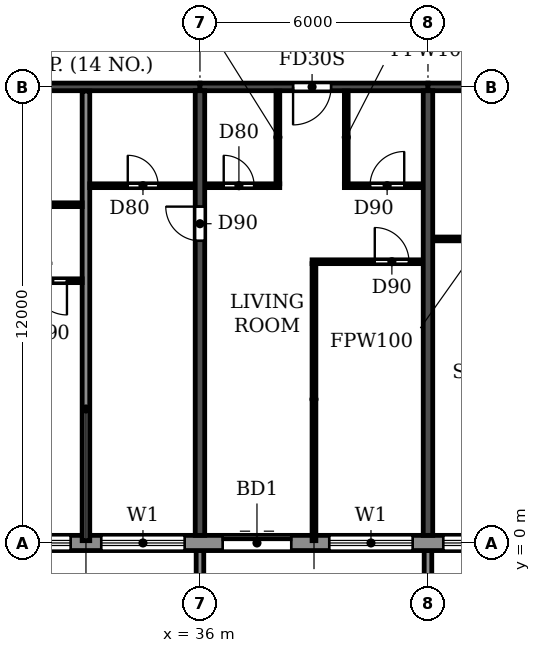
"""IFC4 building model, lengths in metres.
Left out: names, types, materials, properties, quantities, classifications, styles, units other than length and angle.
Written with IfcOpenShell. Run it as: python <this file> out.ifc"""

import sys

from ifc_helpers import new_model, si_unit, direction, frame, frame_2d, origin, place, context, subcontext, project, spatial, polyline, rectangle, outline, extrude, source, transform, mapped, element, fill, save


model = new_model("IFC4")
c1 = context("Model", 3, precision=1e-05, world=origin(), true_north=direction((0.0, 1.0)))
c2 = subcontext(c1, "Body", "Model", "MODEL_VIEW")
j1 = project(units=[si_unit("LENGTHUNIT", "METRE"), si_unit("PLANEANGLEUNIT", "RADIAN")], contexts=[c1])
p1 = place(None, origin())
s1 = spatial("IfcSite", under=j1, at=p1, CompositionType="ELEMENT")
p2 = place(p1, origin())
s2 = spatial("IfcBuilding", under=s1, at=p2, CompositionType="ELEMENT")
p3 = place(p2, frame((0.0, 0.0, 201.6)))
s3 = spatial("IfcBuildingStorey", under=s2, at=p3, CompositionType="ELEMENT", Elevation=201.6)
p4 = place(p3, frame((36.0, 0.2, 0.0), z_axis=(0.0, 0.0, 1.0), x_axis=(0.0, 1.0, 0.0)))
e1 = element("IfcWall", 1, at=p4, inside=s3, PredefinedType="SHEAR", context=c2, shape_type="SweptSolid", body=[
    extrude(rectangle(XDim=11.7, YDim=0.25, at=frame_2d((5.85, 0.0))), origin(), (0.0, 0.0, 1.0), 3.08),
])
p5 = place(p4, frame((7.75, 0.0, 0.0)))
e2 = element("IfcOpeningElement", 2, at=p5, cuts=e1, PredefinedType="OPENING", context=c2, shape_type="SweptSolid", body=[
    extrude(rectangle(XDim=0.9, YDim=2.1, at=frame_2d((0.45, 1.05))), frame((0.0, 0.135, 0.0), z_axis=(0.0, -1.0, 0.0), x_axis=(1.0, 0.0, 0.0)), (0.0, 0.0, 1.0), 0.27),
])
p6 = place(p3, frame((42.0, 0.2, 0.0), z_axis=(0.0, 0.0, 1.0), x_axis=(0.0, 1.0, 0.0)))
e3 = element("IfcWall", 3, at=p6, inside=s3, PredefinedType="SHEAR", context=c2, shape_type="SweptSolid", body=[
    extrude(rectangle(XDim=11.7, YDim=0.25, at=frame_2d((5.85, 0.0))), origin(), (0.0, 0.0, 1.0), 3.08),
])
p7 = place(p3, frame((30.0, 12.0, 0.0), z_axis=(0.0, 0.0, 1.0), x_axis=(1.0, 0.0, 0.0)))
e4 = element("IfcWall", 4, at=p7, inside=s3, PredefinedType="SHEAR", context=c2, shape_type="SweptSolid", body=[
    extrude(rectangle(XDim=6.0, YDim=0.2, at=frame_2d((3.0, 0.0))), origin(), (0.0, 0.0, 1.0), 2.48),
])
p8 = place(p3, frame((36.0, 12.0, 0.0), z_axis=(0.0, 0.0, 1.0), x_axis=(1.0, 0.0, 0.0)))
e5 = element("IfcWall", 5, at=p8, inside=s3, PredefinedType="SHEAR", context=c2, shape_type="SweptSolid", body=[
    extrude(rectangle(XDim=6.0, YDim=0.2, at=frame_2d((3.0, 0.0))), origin(), (0.0, 0.0, 1.0), 2.48),
])
p9 = place(p8, frame((2.45, 0.0, 0.0)))
e6 = element("IfcOpeningElement", 6, at=p9, cuts=e5, PredefinedType="OPENING", context=c2, shape_type="SweptSolid", body=[
    extrude(rectangle(XDim=1.0, YDim=2.1, at=frame_2d((0.5, 1.05))), frame((0.0, 0.11, 0.0), z_axis=(0.0, -1.0, 0.0), x_axis=(1.0, 0.0, 0.0)), (0.0, 0.0, 1.0), 0.22),
])
p10 = place(p3, frame((42.0, 12.0, 0.0), z_axis=(0.0, 0.0, 1.0), x_axis=(1.0, 0.0, 0.0)))
e7 = element("IfcWall", 7, at=p10, inside=s3, PredefinedType="SHEAR", context=c2, shape_type="SweptSolid", body=[
    extrude(rectangle(XDim=6.0, YDim=0.2, at=frame_2d((3.0, 0.0))), origin(), (0.0, 0.0, 1.0), 2.48),
])
p11 = place(p10, frame((2.45, 0.0, 0.0)))
e8 = element("IfcOpeningElement", 8, at=p11, cuts=e7, PredefinedType="OPENING", context=c2, shape_type="SweptSolid", body=[
    extrude(rectangle(XDim=1.0, YDim=2.1, at=frame_2d((0.5, 1.05))), frame((0.0, 0.11, 0.0), z_axis=(0.0, -1.0, 0.0), x_axis=(1.0, 0.0, 0.0)), (0.0, 0.0, 1.0), 0.22),
])
p12 = place(p3, frame((22.683, 0.0, 0.0), z_axis=(0.0, 0.0, 1.0), x_axis=(1.0, 0.0, 0.0)))
e9 = element("IfcWall", 9, at=p12, inside=s3, PredefinedType="STANDARD", context=c2, shape_type="SweptSolid", body=[
    extrude(rectangle(XDim=56.634, YDim=0.4, at=frame_2d((28.317, 0.0))), origin(), (0.0, 0.0, 1.0), 3.08),
])
p13 = place(p12, frame((1.917, 0.0, 0.0)))
e10 = element("IfcOpeningElement", 10, at=p13, cuts=e9, PredefinedType="OPENING", context=c2, shape_type="SweptSolid", body=[
    extrude(rectangle(XDim=1.8, YDim=2.4, at=frame_2d((0.9, 1.2))), frame((0.0, 0.21, 0.0), z_axis=(0.0, -1.0, 0.0), x_axis=(1.0, 0.0, 0.0)), (0.0, 0.0, 1.0), 0.42),
])
p14 = place(p12, frame((4.717, 0.0, 0.9)))
e11 = element("IfcOpeningElement", 11, at=p14, cuts=e9, PredefinedType="OPENING", context=c2, shape_type="SweptSolid", body=[
    extrude(rectangle(XDim=2.2, YDim=1.5, at=frame_2d((1.1, 0.75))), frame((0.0, 0.21, 0.0), z_axis=(0.0, -1.0, 0.0), x_axis=(1.0, 0.0, 0.0)), (0.0, 0.0, 1.0), 0.42),
])
p15 = place(p12, frame((7.717, 0.0, 0.9)))
e12 = element("IfcOpeningElement", 12, at=p15, cuts=e9, PredefinedType="OPENING", context=c2, shape_type="SweptSolid", body=[
    extrude(rectangle(XDim=2.2, YDim=1.5, at=frame_2d((1.1, 0.75))), frame((0.0, 0.21, 0.0), z_axis=(0.0, -1.0, 0.0), x_axis=(1.0, 0.0, 0.0)), (0.0, 0.0, 1.0), 0.42),
])
p16 = place(p12, frame((10.717, 0.0, 0.9)))
e13 = element("IfcOpeningElement", 13, at=p16, cuts=e9, PredefinedType="OPENING", context=c2, shape_type="SweptSolid", body=[
    extrude(rectangle(XDim=2.2, YDim=1.5, at=frame_2d((1.1, 0.75))), frame((0.0, 0.21, 0.0), z_axis=(0.0, -1.0, 0.0), x_axis=(1.0, 0.0, 0.0)), (0.0, 0.0, 1.0), 0.42),
])
p17 = place(p12, frame((13.917, 0.0, 0.0)))
e14 = element("IfcOpeningElement", 14, at=p17, cuts=e9, PredefinedType="OPENING", context=c2, shape_type="SweptSolid", body=[
    extrude(rectangle(XDim=1.8, YDim=2.4, at=frame_2d((0.9, 1.2))), frame((0.0, 0.21, 0.0), z_axis=(0.0, -1.0, 0.0), x_axis=(1.0, 0.0, 0.0)), (0.0, 0.0, 1.0), 0.42),
])
p18 = place(p12, frame((16.717, 0.0, 0.9)))
e15 = element("IfcOpeningElement", 15, at=p18, cuts=e9, PredefinedType="OPENING", context=c2, shape_type="SweptSolid", body=[
    extrude(rectangle(XDim=2.2, YDim=1.5, at=frame_2d((1.1, 0.75))), frame((0.0, 0.21, 0.0), z_axis=(0.0, -1.0, 0.0), x_axis=(1.0, 0.0, 0.0)), (0.0, 0.0, 1.0), 0.42),
])
p19 = place(p12, frame((19.717, 0.0, 0.9)))
e16 = element("IfcOpeningElement", 16, at=p19, cuts=e9, PredefinedType="OPENING", context=c2, shape_type="SweptSolid", body=[
    extrude(rectangle(XDim=2.2, YDim=1.5, at=frame_2d((1.1, 0.75))), frame((0.0, 0.21, 0.0), z_axis=(0.0, -1.0, 0.0), x_axis=(1.0, 0.0, 0.0)), (0.0, 0.0, 1.0), 0.42),
])
p20 = place(p12, frame((22.717, 0.0, 0.9)))
e17 = element("IfcOpeningElement", 17, at=p20, cuts=e9, PredefinedType="OPENING", context=c2, shape_type="SweptSolid", body=[
    extrude(rectangle(XDim=2.2, YDim=1.5, at=frame_2d((1.1, 0.75))), frame((0.0, 0.21, 0.0), z_axis=(0.0, -1.0, 0.0), x_axis=(1.0, 0.0, 0.0)), (0.0, 0.0, 1.0), 0.42),
])
p21 = place(p12, frame((25.917, 0.0, 0.0)))
e18 = element("IfcOpeningElement", 18, at=p21, cuts=e9, PredefinedType="OPENING", context=c2, shape_type="SweptSolid", body=[
    extrude(rectangle(XDim=1.8, YDim=2.4, at=frame_2d((0.9, 1.2))), frame((0.0, 0.21, 0.0), z_axis=(0.0, -1.0, 0.0), x_axis=(1.0, 0.0, 0.0)), (0.0, 0.0, 1.0), 0.42),
])
p22 = place(p12, frame((28.717, 0.0, 0.9)))
e19 = element("IfcOpeningElement", 19, at=p22, cuts=e9, PredefinedType="OPENING", context=c2, shape_type="SweptSolid", body=[
    extrude(rectangle(XDim=2.2, YDim=1.5, at=frame_2d((1.1, 0.75))), frame((0.0, 0.21, 0.0), z_axis=(0.0, -1.0, 0.0), x_axis=(1.0, 0.0, 0.0)), (0.0, 0.0, 1.0), 0.42),
])
p23 = place(p12, frame((31.717, 0.0, 0.9)))
e20 = element("IfcOpeningElement", 20, at=p23, cuts=e9, PredefinedType="OPENING", context=c2, shape_type="SweptSolid", body=[
    extrude(rectangle(XDim=2.2, YDim=1.5, at=frame_2d((1.1, 0.75))), frame((0.0, 0.21, 0.0), z_axis=(0.0, -1.0, 0.0), x_axis=(1.0, 0.0, 0.0)), (0.0, 0.0, 1.0), 0.42),
])
p24 = place(p12, frame((34.717, 0.0, 0.9)))
e21 = element("IfcOpeningElement", 21, at=p24, cuts=e9, PredefinedType="OPENING", context=c2, shape_type="SweptSolid", body=[
    extrude(rectangle(XDim=2.2, YDim=1.5, at=frame_2d((1.1, 0.75))), frame((0.0, 0.21, 0.0), z_axis=(0.0, -1.0, 0.0), x_axis=(1.0, 0.0, 0.0)), (0.0, 0.0, 1.0), 0.42),
])
p25 = place(p12, frame((37.717, 0.0, 0.9)))
e22 = element("IfcOpeningElement", 22, at=p25, cuts=e9, PredefinedType="OPENING", context=c2, shape_type="SweptSolid", body=[
    extrude(rectangle(XDim=2.2, YDim=1.5, at=frame_2d((1.1, 0.75))), frame((0.0, 0.21, 0.0), z_axis=(0.0, -1.0, 0.0), x_axis=(1.0, 0.0, 0.0)), (0.0, 0.0, 1.0), 0.42),
])
p26 = place(p12, frame((40.717, 0.0, 0.9)))
e23 = element("IfcOpeningElement", 23, at=p26, cuts=e9, PredefinedType="OPENING", context=c2, shape_type="SweptSolid", body=[
    extrude(rectangle(XDim=2.2, YDim=1.5, at=frame_2d((1.1, 0.75))), frame((0.0, 0.21, 0.0), z_axis=(0.0, -1.0, 0.0), x_axis=(1.0, 0.0, 0.0)), (0.0, 0.0, 1.0), 0.42),
])
p27 = place(p12, frame((43.717, 0.0, 0.9)))
e24 = element("IfcOpeningElement", 24, at=p27, cuts=e9, PredefinedType="OPENING", context=c2, shape_type="SweptSolid", body=[
    extrude(rectangle(XDim=2.2, YDim=1.5, at=frame_2d((1.1, 0.75))), frame((0.0, 0.21, 0.0), z_axis=(0.0, -1.0, 0.0), x_axis=(1.0, 0.0, 0.0)), (0.0, 0.0, 1.0), 0.42),
])
p28 = place(p12, frame((46.717, 0.0, 0.9)))
e25 = element("IfcOpeningElement", 25, at=p28, cuts=e9, PredefinedType="OPENING", context=c2, shape_type="SweptSolid", body=[
    extrude(rectangle(XDim=2.2, YDim=1.5, at=frame_2d((1.1, 0.75))), frame((0.0, 0.21, 0.0), z_axis=(0.0, -1.0, 0.0), x_axis=(1.0, 0.0, 0.0)), (0.0, 0.0, 1.0), 0.42),
])
p29 = place(p12, frame((49.717, 0.0, 0.9)))
e26 = element("IfcOpeningElement", 26, at=p29, cuts=e9, PredefinedType="OPENING", context=c2, shape_type="SweptSolid", body=[
    extrude(rectangle(XDim=2.2, YDim=1.5, at=frame_2d((1.1, 0.75))), frame((0.0, 0.21, 0.0), z_axis=(0.0, -1.0, 0.0), x_axis=(1.0, 0.0, 0.0)), (0.0, 0.0, 1.0), 0.42),
])
p30 = place(p12, frame((52.917, 0.0, 0.0)))
e27 = element("IfcOpeningElement", 27, at=p30, cuts=e9, PredefinedType="OPENING", context=c2, shape_type="SweptSolid", body=[
    extrude(rectangle(XDim=1.8, YDim=2.4, at=frame_2d((0.9, 1.2))), frame((0.0, 0.21, 0.0), z_axis=(0.0, -1.0, 0.0), x_axis=(1.0, 0.0, 0.0)), (0.0, 0.0, 1.0), 0.42),
])
m1 = source(origin(), c2, "Body", "SweptSolid", [
    extrude(outline(polyline([(0.0, 0.0), (0.2, 0.0), (0.2, 1.65), (0.0, 1.65), (0.0, 0.0)])), origin(), (0.0, 0.0, 1.0), 3.1),
])
for number, where in (
    (28, (35.9, -1.85, 0.0)),
    (29, (41.9, -1.85, 0.0)),
):
    element("IfcWall", number, at=place(p3, frame(where)), inside=s3, PredefinedType="STANDARD", context=c2, shape_type="MappedRepresentation", body=[
        mapped(m1, transform((0.0, 0.0, 0.0))),
    ])
p31 = place(p3, frame((33.0, 0.06, 0.0), z_axis=(0.0, 0.0, 1.0), x_axis=(0.0, 1.0, 0.0)))
e30 = element("IfcWall", 30, at=p31, inside=s3, PredefinedType="PARTITIONING", context=c2, shape_type="SweptSolid", body=[
    extrude(rectangle(XDim=11.83, YDim=0.2, at=frame_2d((5.915, 0.0))), origin(), (0.0, 0.0, 1.0), 3.08),
])
p32 = place(p3, frame((30.135, 6.9, 0.0), z_axis=(0.0, 0.0, 1.0), x_axis=(1.0, 0.0, 0.0)))
e31 = element("IfcWall", 31, at=p32, inside=s3, PredefinedType="PARTITIONING", context=c2, shape_type="SweptSolid", body=[
    extrude(rectangle(XDim=2.765, YDim=0.1, at=frame_2d((1.382, 0.0))), origin(), (0.0, 0.0, 1.0), 3.08),
])
p33 = place(p32, frame((1.465, 0.0, 0.0)))
e32 = element("IfcOpeningElement", 32, at=p33, cuts=e31, PredefinedType="OPENING", context=c2, shape_type="SweptSolid", body=[
    extrude(rectangle(XDim=0.9, YDim=2.1, at=frame_2d((0.45, 1.05))), frame((0.0, 0.06, 0.0), z_axis=(0.0, -1.0, 0.0), x_axis=(1.0, 0.0, 0.0)), (0.0, 0.0, 1.0), 0.12),
])
p34 = place(p3, frame((38.95, 7.4, 0.0), z_axis=(0.0, 0.0, 1.0), x_axis=(1.0, 0.0, 0.0)))
e33 = element("IfcWall", 33, at=p34, inside=s3, PredefinedType="PARTITIONING", context=c2, shape_type="SweptSolid", body=[
    extrude(rectangle(XDim=2.915, YDim=0.1, at=frame_2d((1.458, 0.0))), origin(), (0.0, 0.0, 1.0), 3.08),
])
p35 = place(p34, frame((1.65, 0.0, 0.0)))
e34 = element("IfcOpeningElement", 34, at=p35, cuts=e33, PredefinedType="OPENING", context=c2, shape_type="SweptSolid", body=[
    extrude(rectangle(XDim=0.9, YDim=2.1, at=frame_2d((0.45, 1.05))), frame((0.0, 0.06, 0.0), z_axis=(0.0, -1.0, 0.0), x_axis=(1.0, 0.0, 0.0)), (0.0, 0.0, 1.0), 0.12),
])
p36 = place(p3, frame((42.135, 8.0, 0.0), z_axis=(0.0, 0.0, 1.0), x_axis=(1.0, 0.0, 0.0)))
e35 = element("IfcWall", 35, at=p36, inside=s3, PredefinedType="PARTITIONING", context=c2, shape_type="SweptSolid", body=[
    extrude(rectangle(XDim=1.965, YDim=0.1, at=frame_2d((0.982, 0.0))), origin(), (0.0, 0.0, 1.0), 3.08),
])
p37 = place(p3, frame((30.135, 8.9, 0.0), z_axis=(0.0, 0.0, 1.0), x_axis=(1.0, 0.0, 0.0)))
e36 = element("IfcWall", 36, at=p37, inside=s3, PredefinedType="PARTITIONING", context=c2, shape_type="SweptSolid", body=[
    extrude(rectangle(XDim=2.765, YDim=0.1, at=frame_2d((1.382, 0.0))), origin(), (0.0, 0.0, 1.0), 3.08),
])
p38 = place(p37, frame((0.965, 0.0, 0.0)))
e37 = element("IfcOpeningElement", 37, at=p38, cuts=e36, PredefinedType="OPENING", context=c2, shape_type="SweptSolid", body=[
    extrude(rectangle(XDim=0.8, YDim=2.1, at=frame_2d((0.4, 1.05))), frame((0.0, 0.06, 0.0), z_axis=(0.0, -1.0, 0.0), x_axis=(1.0, 0.0, 0.0)), (0.0, 0.0, 1.0), 0.12),
])
p39 = place(p3, frame((33.1, 9.4, 0.0), z_axis=(0.0, 0.0, 1.0), x_axis=(1.0, 0.0, 0.0)))
e38 = element("IfcWall", 38, at=p39, inside=s3, PredefinedType="PARTITIONING", context=c2, shape_type="SweptSolid", body=[
    extrude(rectangle(XDim=2.765, YDim=0.1, at=frame_2d((1.382, 0.0))), origin(), (0.0, 0.0, 1.0), 3.08),
])
p40 = place(p39, frame((1.0, 0.0, 0.0)))
e39 = element("IfcOpeningElement", 39, at=p40, cuts=e38, PredefinedType="OPENING", context=c2, shape_type="SweptSolid", body=[
    extrude(rectangle(XDim=0.8, YDim=2.1, at=frame_2d((0.4, 1.05))), frame((0.0, 0.06, 0.0), z_axis=(0.0, -1.0, 0.0), x_axis=(1.0, 0.0, 0.0)), (0.0, 0.0, 1.0), 0.12),
])
p41 = place(p3, frame((36.135, 9.4, 0.0), z_axis=(0.0, 0.0, 1.0), x_axis=(1.0, 0.0, 0.0)))
e40 = element("IfcWall", 40, at=p41, inside=s3, PredefinedType="PARTITIONING", context=c2, shape_type="SweptSolid", body=[
    extrude(rectangle(XDim=1.965, YDim=0.1, at=frame_2d((0.982, 0.0))), origin(), (0.0, 0.0, 1.0), 3.08),
])
p42 = place(p41, frame((0.49, 0.0, 0.0)))
e41 = element("IfcOpeningElement", 41, at=p42, cuts=e40, PredefinedType="OPENING", context=c2, shape_type="SweptSolid", body=[
    extrude(rectangle(XDim=0.8, YDim=2.1, at=frame_2d((0.4, 1.05))), frame((0.0, 0.06, 0.0), z_axis=(0.0, -1.0, 0.0), x_axis=(1.0, 0.0, 0.0)), (0.0, 0.0, 1.0), 0.12),
])
p43 = place(p3, frame((39.8, 9.4, 0.0), z_axis=(0.0, 0.0, 1.0), x_axis=(1.0, 0.0, 0.0)))
e42 = element("IfcWall", 42, at=p43, inside=s3, PredefinedType="PARTITIONING", context=c2, shape_type="SweptSolid", body=[
    extrude(rectangle(XDim=2.065, YDim=0.1, at=frame_2d((1.032, 0.0))), origin(), (0.0, 0.0, 1.0), 3.08),
])
p44 = place(p43, frame((0.675, 0.0, 0.0)))
e43 = element("IfcOpeningElement", 43, at=p44, cuts=e42, PredefinedType="OPENING", context=c2, shape_type="SweptSolid", body=[
    extrude(rectangle(XDim=0.9, YDim=2.1, at=frame_2d((0.45, 1.05))), frame((0.0, 0.06, 0.0), z_axis=(0.0, -1.0, 0.0), x_axis=(1.0, 0.0, 0.0)), (0.0, 0.0, 1.0), 0.12),
])
p45 = place(p3, frame((38.05, 9.45, 0.0), z_axis=(0.0, 0.0, 1.0), x_axis=(0.0, 1.0, 0.0)))
e44 = element("IfcWall", 44, at=p45, inside=s3, PredefinedType="PARTITIONING", context=c2, shape_type="SweptSolid", body=[
    extrude(rectangle(XDim=2.44, YDim=0.1, at=frame_2d((1.22, 0.0))), origin(), (0.0, 0.0, 1.0), 3.08),
])
p46 = place(p3, frame((39.0, 0.06, 0.0), z_axis=(0.0, 0.0, 1.0), x_axis=(0.0, 1.0, 0.0)))
e45 = element("IfcWall", 45, at=p46, inside=s3, PredefinedType="PARTITIONING", context=c2, shape_type="SweptSolid", body=[
    extrude(rectangle(XDim=7.29, YDim=0.1, at=frame_2d((3.645, 0.0))), origin(), (0.0, 0.0, 1.0), 3.08),
])
p47 = place(p3, frame((39.85, 9.45, 0.0), z_axis=(0.0, 0.0, 1.0), x_axis=(0.0, 1.0, 0.0)))
e46 = element("IfcWall", 46, at=p47, inside=s3, PredefinedType="PARTITIONING", context=c2, shape_type="SweptSolid", body=[
    extrude(rectangle(XDim=2.44, YDim=0.1, at=frame_2d((1.22, 0.0))), origin(), (0.0, 0.0, 1.0), 3.08),
])
p48 = place(p15, origin())
e47 = element("IfcWindow", 47, at=p48, inside=s3, PartitioningType="DOUBLE_PANEL_HORIZONTAL", PredefinedType="WINDOW", context=c2, shape_type="SweptSolid", body=[
    extrude(rectangle(XDim=2.2, YDim=1.5, at=frame_2d((1.1, 0.75))), frame((0.0, 0.03, 0.0), z_axis=(0.0, -1.0, 0.0), x_axis=(1.0, 0.0, 0.0)), (0.0, 0.0, 1.0), 0.06),
])
fill(e12, e47)
p49 = place(p16, origin())
e48 = element("IfcWindow", 48, at=p49, inside=s3, PartitioningType="DOUBLE_PANEL_HORIZONTAL", PredefinedType="WINDOW", context=c2, shape_type="SweptSolid", body=[
    extrude(rectangle(XDim=2.2, YDim=1.5, at=frame_2d((1.1, 0.75))), frame((0.0, 0.03, 0.0), z_axis=(0.0, -1.0, 0.0), x_axis=(1.0, 0.0, 0.0)), (0.0, 0.0, 1.0), 0.06),
])
fill(e13, e48)
p50 = place(p17, origin())
e49 = element("IfcDoor", 49, at=p50, inside=s3, OperationType="DOUBLE_DOOR_SLIDING", PredefinedType="DOOR", context=c2, shape_type="SweptSolid", body=[
    extrude(rectangle(XDim=1.8, YDim=2.4, at=frame_2d((0.9, 1.2))), frame((0.0, 0.025, 0.0), z_axis=(0.0, -1.0, 0.0), x_axis=(1.0, 0.0, 0.0)), (0.0, 0.0, 1.0), 0.05),
])
fill(e14, e49)
p51 = place(p18, origin())
e50 = element("IfcWindow", 50, at=p51, inside=s3, PartitioningType="DOUBLE_PANEL_HORIZONTAL", PredefinedType="WINDOW", context=c2, shape_type="SweptSolid", body=[
    extrude(rectangle(XDim=2.2, YDim=1.5, at=frame_2d((1.1, 0.75))), frame((0.0, 0.03, 0.0), z_axis=(0.0, -1.0, 0.0), x_axis=(1.0, 0.0, 0.0)), (0.0, 0.0, 1.0), 0.06),
])
fill(e15, e50)
p52 = place(p19, origin())
e51 = element("IfcWindow", 51, at=p52, inside=s3, PartitioningType="DOUBLE_PANEL_HORIZONTAL", PredefinedType="WINDOW", context=c2, shape_type="SweptSolid", body=[
    extrude(rectangle(XDim=2.2, YDim=1.5, at=frame_2d((1.1, 0.75))), frame((0.0, 0.03, 0.0), z_axis=(0.0, -1.0, 0.0), x_axis=(1.0, 0.0, 0.0)), (0.0, 0.0, 1.0), 0.06),
])
fill(e16, e51)
p53 = place(p33, frame((0.9, 0.0, 0.0), z_axis=(0.0, 0.0, 1.0), x_axis=(-1.0, 0.0, 0.0)))
e52 = element("IfcDoor", 52, at=p53, inside=s3, OperationType="SINGLE_SWING_LEFT", PredefinedType="DOOR", context=c2, shape_type="SweptSolid", body=[
    extrude(rectangle(XDim=0.9, YDim=2.1, at=frame_2d((0.45, 1.05))), frame((0.0, 0.025, 0.0), z_axis=(0.0, -1.0, 0.0), x_axis=(1.0, 0.0, 0.0)), (0.0, 0.0, 1.0), 0.05),
])
fill(e32, e52)
p54 = place(p40, origin())
e53 = element("IfcDoor", 53, at=p54, inside=s3, OperationType="SINGLE_SWING_LEFT", PredefinedType="DOOR", context=c2, shape_type="SweptSolid", body=[
    extrude(rectangle(XDim=0.8, YDim=2.1, at=frame_2d((0.4, 1.05))), frame((0.0, 0.025, 0.0), z_axis=(0.0, -1.0, 0.0), x_axis=(1.0, 0.0, 0.0)), (0.0, 0.0, 1.0), 0.05),
])
fill(e39, e53)
p55 = place(p5, origin())
e54 = element("IfcDoor", 54, at=p55, inside=s3, OperationType="SINGLE_SWING_RIGHT", PredefinedType="DOOR", context=c2, shape_type="SweptSolid", body=[
    extrude(rectangle(XDim=0.9, YDim=2.1, at=frame_2d((0.45, 1.05))), frame((0.0, 0.025, 0.0), z_axis=(0.0, -1.0, 0.0), x_axis=(1.0, 0.0, 0.0)), (0.0, 0.0, 1.0), 0.05),
])
fill(e2, e54)
p56 = place(p42, origin())
e55 = element("IfcDoor", 55, at=p56, inside=s3, OperationType="SINGLE_SWING_LEFT", PredefinedType="DOOR", context=c2, shape_type="SweptSolid", body=[
    extrude(rectangle(XDim=0.8, YDim=2.1, at=frame_2d((0.4, 1.05))), frame((0.0, 0.025, 0.0), z_axis=(0.0, -1.0, 0.0), x_axis=(1.0, 0.0, 0.0)), (0.0, 0.0, 1.0), 0.05),
])
fill(e41, e55)
p57 = place(p9, frame((1.0, 0.0, 0.0), z_axis=(0.0, 0.0, 1.0), x_axis=(-1.0, 0.0, 0.0)))
e56 = element("IfcDoor", 56, at=p57, inside=s3, OperationType="SINGLE_SWING_RIGHT", PredefinedType="DOOR", context=c2, shape_type="SweptSolid", body=[
    extrude(rectangle(XDim=1.0, YDim=2.1, at=frame_2d((0.5, 1.05))), frame((0.0, 0.025, 0.0), z_axis=(0.0, -1.0, 0.0), x_axis=(1.0, 0.0, 0.0)), (0.0, 0.0, 1.0), 0.05),
])
fill(e6, e56)
p58 = place(p44, origin())
e57 = element("IfcDoor", 57, at=p58, inside=s3, OperationType="SINGLE_SWING_RIGHT", PredefinedType="DOOR", context=c2, shape_type="SweptSolid", body=[
    extrude(rectangle(XDim=0.9, YDim=2.1, at=frame_2d((0.45, 1.05))), frame((0.0, 0.025, 0.0), z_axis=(0.0, -1.0, 0.0), x_axis=(1.0, 0.0, 0.0)), (0.0, 0.0, 1.0), 0.05),
])
fill(e43, e57)
p59 = place(p35, origin())
e58 = element("IfcDoor", 58, at=p59, inside=s3, OperationType="SINGLE_SWING_LEFT", PredefinedType="DOOR", context=c2, shape_type="SweptSolid", body=[
    extrude(rectangle(XDim=0.9, YDim=2.1, at=frame_2d((0.45, 1.05))), frame((0.0, 0.025, 0.0), z_axis=(0.0, -1.0, 0.0), x_axis=(1.0, 0.0, 0.0)), (0.0, 0.0, 1.0), 0.05),
])
fill(e34, e58)
save(model, sys.argv[1])
